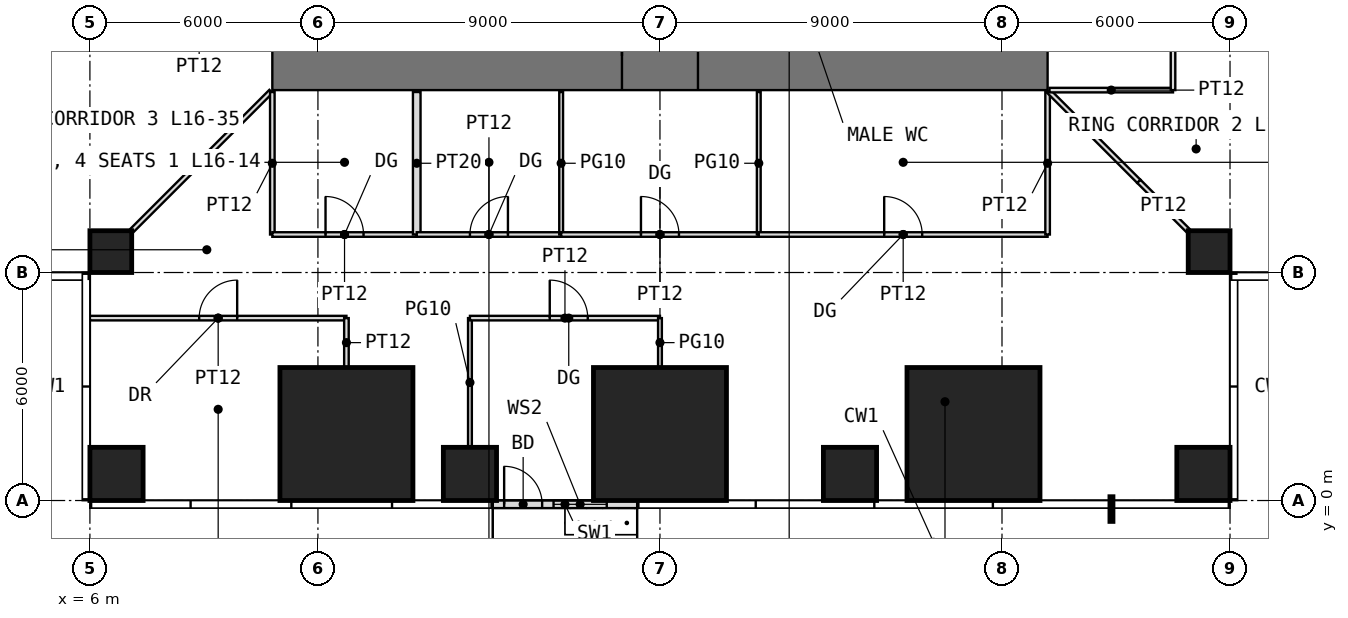
"""IFC4 building model, lengths in metres.
Left out: names, types, materials, properties, quantities, classifications, styles, units other than length and angle.
Written with IfcOpenShell. Run it as: python <this file> out.ifc"""

import sys

from ifc_helpers import new_model, si_unit, direction, frame, frame_2d, origin, origin_2d, place, context, subcontext, project, spatial, rectangle, extrude, element, fill, save


model = new_model("IFC4")
c1 = context("Model", 3, precision=1e-05, world=origin(), true_north=direction((0.0, 1.0)))
c2 = subcontext(c1, "Body", "Model", "MODEL_VIEW")
j1 = project(units=[si_unit("LENGTHUNIT", "METRE"), si_unit("PLANEANGLEUNIT", "RADIAN")], contexts=[c1])
p1 = place(None, origin())
s1 = spatial("IfcSite", under=j1, at=p1, CompositionType="ELEMENT")
p2 = place(p1, origin())
s2 = spatial("IfcBuilding", under=s1, at=p2, CompositionType="ELEMENT")
p3 = place(p2, frame((0.0, 0.0, 70.5)))
s3 = spatial("IfcBuildingStorey", under=s2, at=p3, CompositionType="ELEMENT", Elevation=70.5)
p4 = place(p3, frame((6.7, 0.7, 0.0), z_axis=(0.0, 0.0, 1.0), x_axis=(1.0, 0.0, 0.0)))
e1 = element("IfcColumn", 1, at=p4, inside=s3, PredefinedType="COLUMN", context=c2, shape_type="SweptSolid", body=[
    extrude(rectangle(XDim=1.4, YDim=1.4, at=origin_2d()), origin(), (0.0, 0.0, 1.0), 4.0),
])
p5 = place(p3, frame((12.75, 1.75, 0.0), z_axis=(0.0, 0.0, 1.0), x_axis=(1.0, 0.0, 0.0)))
e2 = element("IfcColumn", 2, at=p5, inside=s3, PredefinedType="COLUMN", context=c2, shape_type="SweptSolid", body=[
    extrude(rectangle(XDim=3.5, YDim=3.5, at=origin_2d()), origin(), (0.0, 0.0, 1.0), 4.0),
])
p6 = place(p3, frame((16.0, 0.7, 0.0), z_axis=(0.0, 0.0, 1.0), x_axis=(1.0, 0.0, 0.0)))
e3 = element("IfcColumn", 3, at=p6, inside=s3, PredefinedType="COLUMN", context=c2, shape_type="SweptSolid", body=[
    extrude(rectangle(XDim=1.4, YDim=1.4, at=origin_2d()), origin(), (0.0, 0.0, 1.0), 4.0),
])
p7 = place(p3, frame((21.0, 1.75, 0.0), z_axis=(0.0, 0.0, 1.0), x_axis=(1.0, 0.0, 0.0)))
e4 = element("IfcColumn", 4, at=p7, inside=s3, PredefinedType="COLUMN", context=c2, shape_type="SweptSolid", body=[
    extrude(rectangle(XDim=3.5, YDim=3.5, at=origin_2d()), origin(), (0.0, 0.0, 1.0), 4.0),
])
p8 = place(p3, frame((26.0, 0.7, 0.0), z_axis=(0.0, 0.0, 1.0), x_axis=(1.0, 0.0, 0.0)))
e5 = element("IfcColumn", 5, at=p8, inside=s3, PredefinedType="COLUMN", context=c2, shape_type="SweptSolid", body=[
    extrude(rectangle(XDim=1.4, YDim=1.4, at=origin_2d()), origin(), (0.0, 0.0, 1.0), 4.0),
])
p9 = place(p3, frame((29.25, 1.75, 0.0), z_axis=(0.0, 0.0, 1.0), x_axis=(1.0, 0.0, 0.0)))
e6 = element("IfcColumn", 6, at=p9, inside=s3, PredefinedType="COLUMN", context=c2, shape_type="SweptSolid", body=[
    extrude(rectangle(XDim=3.5, YDim=3.5, at=origin_2d()), origin(), (0.0, 0.0, 1.0), 4.0),
])
p10 = place(p3, frame((35.3, 0.7, 0.0), z_axis=(0.0, 0.0, 1.0), x_axis=(1.0, 0.0, 0.0)))
e7 = element("IfcColumn", 7, at=p10, inside=s3, PredefinedType="COLUMN", context=c2, shape_type="SweptSolid", body=[
    extrude(rectangle(XDim=1.4, YDim=1.4, at=origin_2d()), origin(), (0.0, 0.0, 1.0), 4.0),
])
for number, where, z_axis, x_axis in (
    (8, (6.55, 6.55, 0.0), (0.0, 0.0, 1.0), (1.0, 0.0, 0.0)),
    (9, (35.45, 6.55, 0.0), (0.0, 0.0, 1.0), (1.0, 0.0, 0.0)),
):
    element("IfcColumn", number, at=place(p3, frame(where, z_axis=z_axis, x_axis=x_axis)), inside=s3, PredefinedType="COLUMN", context=c2, shape_type="SweptSolid", body=[
        extrude(rectangle(XDim=1.1, YDim=1.1, at=origin_2d()), origin(), (0.0, 0.0, 1.0), 4.0),
    ])
p11 = place(p3, frame((16.6, -0.1, 0.0), z_axis=(0.0, 0.0, 1.0), x_axis=(1.0, 0.0, 0.0)))
e10 = element("IfcWall", 10, at=p11, inside=s3, PredefinedType="USERDEFINED", context=c2, shape_type="SweptSolid", body=[
    extrude(rectangle(XDim=3.8, YDim=0.2, at=frame_2d((1.9, 0.0))), origin(), (0.0, 0.0, 1.0), 3.75),
])
p12 = place(p11, frame((0.3, 0.0, 0.0)))
e11 = element("IfcOpeningElement", 11, at=p12, cuts=e10, PredefinedType="OPENING", context=c2, shape_type="SweptSolid", body=[
    extrude(rectangle(XDim=1.0, YDim=2.4, at=frame_2d((0.5, 1.2))), frame((0.0, 0.11, 0.0), z_axis=(0.0, -1.0, 0.0), x_axis=(1.0, 0.0, 0.0)), (0.0, 0.0, 1.0), 0.22),
])
p13 = place(p11, frame((1.6, 0.0, 0.3)))
e12 = element("IfcOpeningElement", 12, at=p13, cuts=e10, PredefinedType="OPENING", context=c2, shape_type="SweptSolid", body=[
    extrude(rectangle(XDim=1.4, YDim=2.7, at=frame_2d((0.7, 1.35))), frame((0.0, 0.11, 0.0), z_axis=(0.0, -1.0, 0.0), x_axis=(1.0, 0.0, 0.0)), (0.0, 0.0, 1.0), 0.22),
])
p14 = place(p3, frame((10.8, 11.7, -0.05), z_axis=(0.0, 0.0, 1.0), x_axis=(1.0, 0.0, 0.0)))
e13 = element("IfcWall", 13, at=p14, inside=s3, PredefinedType="SHEAR", context=c2, shape_type="SweptSolid", body=[
    extrude(rectangle(XDim=20.4, YDim=1.8, at=frame_2d((10.2, 0.0))), origin(), (0.0, 0.0, 1.0), 4.0),
])
p15 = place(p14, frame((9.2, 0.0, 0.05)))
e14 = element("IfcOpeningElement", 14, at=p15, cuts=e13, PredefinedType="OPENING", context=c2, shape_type="SweptSolid", body=[
    extrude(rectangle(XDim=2.0, YDim=2.2, at=frame_2d((1.0, 1.1))), frame((0.0, 0.91, 0.0), z_axis=(0.0, -1.0, 0.0), x_axis=(1.0, 0.0, 0.0)), (0.0, 0.0, 1.0), 1.82),
])
p16 = place(p3, frame((6.0, 4.8, 0.0), z_axis=(0.0, 0.0, 1.0), x_axis=(1.0, 0.0, 0.0)))
e15 = element("IfcWall", 15, at=p16, inside=s3, PredefinedType="PARTITIONING", context=c2, shape_type="SweptSolid", body=[
    extrude(rectangle(XDim=6.75, YDim=0.12, at=frame_2d((3.375, 0.0))), origin(), (0.0, 0.0, 1.0), 3.75),
])
p17 = place(p16, frame((2.875, 0.0, 0.0)))
e16 = element("IfcOpeningElement", 16, at=p17, cuts=e15, PredefinedType="OPENING", context=c2, shape_type="SweptSolid", body=[
    extrude(rectangle(XDim=1.0, YDim=2.2, at=frame_2d((0.5, 1.1))), frame((0.0, 0.07, 0.0), z_axis=(0.0, -1.0, 0.0), x_axis=(1.0, 0.0, 0.0)), (0.0, 0.0, 1.0), 0.14),
])
p18 = place(p3, frame((7.11, 7.11, 0.0), z_axis=(0.0, 0.0, 1.0), x_axis=(0.707106781187, 0.707106781187, 0.0)))
e17 = element("IfcWall", 17, at=p18, inside=s3, PredefinedType="PARTITIONING", context=c2, shape_type="SweptSolid", body=[
    extrude(rectangle(XDim=5.168, YDim=0.12, at=frame_2d((2.584, 0.0))), origin(), (0.0, 0.0, 1.0), 3.75),
])
p19 = place(p3, frame((10.8, 7.0, 0.0), z_axis=(0.0, 0.0, 1.0), x_axis=(0.0, 1.0, 0.0)))
e18 = element("IfcWall", 18, at=p19, inside=s3, PredefinedType="PARTITIONING", context=c2, shape_type="SweptSolid", body=[
    extrude(rectangle(XDim=3.75, YDim=0.12, at=frame_2d((1.875, 0.0))), origin(), (0.0, 0.0, 1.0), 3.75),
])
p20 = place(p3, frame((10.8, 7.0, 0.0), z_axis=(0.0, 0.0, 1.0), x_axis=(1.0, 0.0, 0.0)))
e19 = element("IfcWall", 19, at=p20, inside=s3, PredefinedType="PARTITIONING", context=c2, shape_type="SweptSolid", body=[
    extrude(rectangle(XDim=3.8, YDim=0.12, at=frame_2d((1.9, 0.0))), origin(), (0.0, 0.0, 1.0), 3.75),
])
p21 = place(p20, frame((1.4, 0.0, 0.0)))
e20 = element("IfcOpeningElement", 20, at=p21, cuts=e19, PredefinedType="OPENING", context=c2, shape_type="SweptSolid", body=[
    extrude(rectangle(XDim=1.0, YDim=2.4, at=frame_2d((0.5, 1.2))), frame((0.0, 0.07, 0.0), z_axis=(0.0, -1.0, 0.0), x_axis=(1.0, 0.0, 0.0)), (0.0, 0.0, 1.0), 0.14),
])
p22 = place(p3, frame((12.75, 3.51, 0.0), z_axis=(0.0, 0.0, 1.0), x_axis=(0.0, 1.0, 0.0)))
e21 = element("IfcWall", 21, at=p22, inside=s3, PredefinedType="PARTITIONING", context=c2, shape_type="SweptSolid", body=[
    extrude(rectangle(XDim=1.29, YDim=0.12, at=frame_2d((0.645, 0.0))), origin(), (0.0, 0.0, 1.0), 3.75),
])
p23 = place(p3, frame((14.6, 7.0, 0.0), z_axis=(0.0, 0.0, 1.0), x_axis=(0.0, 1.0, 0.0)))
e22 = element("IfcWall", 22, at=p23, inside=s3, PredefinedType="PARTITIONING", context=c2, shape_type="SweptSolid", body=[
    extrude(rectangle(XDim=3.75, YDim=0.2, at=frame_2d((1.875, 0.0))), origin(), (0.0, 0.0, 1.0), 3.75),
])
p24 = place(p3, frame((14.6, 7.0, 0.0), z_axis=(0.0, 0.0, 1.0), x_axis=(1.0, 0.0, 0.0)))
e23 = element("IfcWall", 23, at=p24, inside=s3, PredefinedType="PARTITIONING", context=c2, shape_type="SweptSolid", body=[
    extrude(rectangle(XDim=3.8, YDim=0.12, at=frame_2d((1.9, 0.0))), origin(), (0.0, 0.0, 1.0), 3.75),
])
p25 = place(p24, frame((1.4, 0.0, 0.0)))
e24 = element("IfcOpeningElement", 24, at=p25, cuts=e23, PredefinedType="OPENING", context=c2, shape_type="SweptSolid", body=[
    extrude(rectangle(XDim=1.0, YDim=2.4, at=frame_2d((0.5, 1.2))), frame((0.0, 0.07, 0.0), z_axis=(0.0, -1.0, 0.0), x_axis=(1.0, 0.0, 0.0)), (0.0, 0.0, 1.0), 0.14),
])
p26 = place(p3, frame((16.0, 1.41, 0.0), z_axis=(0.0, 0.0, 1.0), x_axis=(0.0, 1.0, 0.0)))
e25 = element("IfcWall", 25, at=p26, inside=s3, PredefinedType="PARTITIONING", context=c2, shape_type="SweptSolid", body=[
    extrude(rectangle(XDim=3.39, YDim=0.1, at=frame_2d((1.695, 0.0))), origin(), (0.0, 0.0, 1.0), 3.75),
])
p27 = place(p3, frame((16.0, 4.8, 0.0), z_axis=(0.0, 0.0, 1.0), x_axis=(1.0, 0.0, 0.0)))
e26 = element("IfcWall", 26, at=p27, inside=s3, PredefinedType="PARTITIONING", context=c2, shape_type="SweptSolid", body=[
    extrude(rectangle(XDim=5.0, YDim=0.12, at=frame_2d((2.5, 0.0))), origin(), (0.0, 0.0, 1.0), 3.75),
])
p28 = place(p27, frame((2.1, 0.0, 0.0)))
e27 = element("IfcOpeningElement", 27, at=p28, cuts=e26, PredefinedType="OPENING", context=c2, shape_type="SweptSolid", body=[
    extrude(rectangle(XDim=1.0, YDim=2.4, at=frame_2d((0.5, 1.2))), frame((0.0, 0.07, 0.0), z_axis=(0.0, -1.0, 0.0), x_axis=(1.0, 0.0, 0.0)), (0.0, 0.0, 1.0), 0.14),
])
p29 = place(p3, frame((18.4, 7.0, 0.0), z_axis=(0.0, 0.0, 1.0), x_axis=(0.0, 1.0, 0.0)))
e28 = element("IfcWall", 28, at=p29, inside=s3, PredefinedType="PARTITIONING", context=c2, shape_type="SweptSolid", body=[
    extrude(rectangle(XDim=3.75, YDim=0.1, at=frame_2d((1.875, 0.0))), origin(), (0.0, 0.0, 1.0), 3.75),
])
p30 = place(p3, frame((18.4, 7.0, 0.0), z_axis=(0.0, 0.0, 1.0), x_axis=(1.0, 0.0, 0.0)))
e29 = element("IfcWall", 29, at=p30, inside=s3, PredefinedType="PARTITIONING", context=c2, shape_type="SweptSolid", body=[
    extrude(rectangle(XDim=5.2, YDim=0.12, at=frame_2d((2.6, 0.0))), origin(), (0.0, 0.0, 1.0), 3.75),
])
p31 = place(p30, frame((2.1, 0.0, 0.0)))
e30 = element("IfcOpeningElement", 30, at=p31, cuts=e29, PredefinedType="OPENING", context=c2, shape_type="SweptSolid", body=[
    extrude(rectangle(XDim=1.0, YDim=2.4, at=frame_2d((0.5, 1.2))), frame((0.0, 0.07, 0.0), z_axis=(0.0, -1.0, 0.0), x_axis=(1.0, 0.0, 0.0)), (0.0, 0.0, 1.0), 0.14),
])
p32 = place(p3, frame((21.0, 3.51, 0.0), z_axis=(0.0, 0.0, 1.0), x_axis=(0.0, 1.0, 0.0)))
e31 = element("IfcWall", 31, at=p32, inside=s3, PredefinedType="PARTITIONING", context=c2, shape_type="SweptSolid", body=[
    extrude(rectangle(XDim=1.29, YDim=0.1, at=frame_2d((0.645, 0.0))), origin(), (0.0, 0.0, 1.0), 3.75),
])
p33 = place(p3, frame((23.6, 7.0, 0.0), z_axis=(0.0, 0.0, 1.0), x_axis=(0.0, 1.0, 0.0)))
e32 = element("IfcWall", 32, at=p33, inside=s3, PredefinedType="PARTITIONING", context=c2, shape_type="SweptSolid", body=[
    extrude(rectangle(XDim=3.75, YDim=0.1, at=frame_2d((1.875, 0.0))), origin(), (0.0, 0.0, 1.0), 3.75),
])
p34 = place(p3, frame((23.6, 7.0, 0.0), z_axis=(0.0, 0.0, 1.0), x_axis=(1.0, 0.0, 0.0)))
e33 = element("IfcWall", 33, at=p34, inside=s3, PredefinedType="PARTITIONING", context=c2, shape_type="SweptSolid", body=[
    extrude(rectangle(XDim=7.6, YDim=0.12, at=frame_2d((3.8, 0.0))), origin(), (0.0, 0.0, 1.0), 3.75),
])
p35 = place(p34, frame((3.3, 0.0, 0.0)))
e34 = element("IfcOpeningElement", 34, at=p35, cuts=e33, PredefinedType="OPENING", context=c2, shape_type="SweptSolid", body=[
    extrude(rectangle(XDim=1.0, YDim=2.4, at=frame_2d((0.5, 1.2))), frame((0.0, 0.07, 0.0), z_axis=(0.0, -1.0, 0.0), x_axis=(1.0, 0.0, 0.0)), (0.0, 0.0, 1.0), 0.14),
])
p36 = place(p3, frame((31.2, 7.0, 0.0), z_axis=(0.0, 0.0, 1.0), x_axis=(0.0, 1.0, 0.0)))
e35 = element("IfcWall", 35, at=p36, inside=s3, PredefinedType="PARTITIONING", context=c2, shape_type="SweptSolid", body=[
    extrude(rectangle(XDim=3.75, YDim=0.12, at=frame_2d((1.875, 0.0))), origin(), (0.0, 0.0, 1.0), 3.75),
])
p37 = place(p3, frame((31.235, 10.765, 0.0), z_axis=(0.0, 0.0, 1.0), x_axis=(0.707106781187, -0.707106781187, 0.0)))
e36 = element("IfcWall", 36, at=p37, inside=s3, PredefinedType="PARTITIONING", context=c2, shape_type="SweptSolid", body=[
    extrude(rectangle(XDim=3.346, YDim=0.12, at=frame_2d((1.673, 0.0))), origin(), (0.0, 0.0, 1.0), 3.75),
])
p38 = place(p3, frame((31.25, 10.8, 0.0), z_axis=(0.0, 0.0, 1.0), x_axis=(1.0, 0.0, 0.0)))
e37 = element("IfcWall", 37, at=p38, inside=s3, PredefinedType="PARTITIONING", context=c2, shape_type="SweptSolid", body=[
    extrude(rectangle(XDim=3.25, YDim=0.12, at=frame_2d((1.625, 0.0))), origin(), (0.0, 0.0, 1.0), 3.75),
])
p39 = place(p3, frame((33.602, 8.398, 0.0), z_axis=(0.0, 0.0, 1.0), x_axis=(0.707106781187, -0.707106781187, 0.0)))
e38 = element("IfcWall", 38, at=p39, inside=s3, PredefinedType="PARTITIONING", context=c2, shape_type="SweptSolid", body=[
    extrude(rectangle(XDim=1.822, YDim=0.12, at=frame_2d((0.911, 0.0))), origin(), (0.0, 0.0, 1.0), 3.75),
])
p40 = place(p3, frame((34.5, 10.8, 0.0), z_axis=(0.0, 0.0, 1.0), x_axis=(0.0, 1.0, 0.0)))
e39 = element("IfcWall", 39, at=p40, inside=s3, PredefinedType="PARTITIONING", context=c2, shape_type="SweptSolid", body=[
    extrude(rectangle(XDim=3.8, YDim=0.12, at=frame_2d((1.9, 0.0))), origin(), (0.0, 0.0, 1.0), 3.75),
])
p41 = place(p40, frame((1.4, 0.0, 0.0)))
e40 = element("IfcOpeningElement", 40, at=p41, cuts=e39, PredefinedType="OPENING", context=c2, shape_type="SweptSolid", body=[
    extrude(rectangle(XDim=1.0, YDim=2.2, at=frame_2d((0.5, 1.1))), frame((0.0, 0.07, 0.0), z_axis=(0.0, -1.0, 0.0), x_axis=(1.0, 0.0, 0.0)), (0.0, 0.0, 1.0), 0.14),
])
p42 = place(p12, origin())
e41 = element("IfcDoor", 41, at=p42, inside=s3, OperationType="SINGLE_SWING_LEFT", PredefinedType="DOOR", context=c2, shape_type="SweptSolid", body=[
    extrude(rectangle(XDim=1.0, YDim=2.4, at=frame_2d((0.5, 1.2))), frame((0.0, 0.025, 0.0), z_axis=(0.0, -1.0, 0.0), x_axis=(1.0, 0.0, 0.0)), (0.0, 0.0, 1.0), 0.05),
])
fill(e11, e41)
p43 = place(p13, origin())
e42 = element("IfcWindow", 42, at=p43, inside=s3, PartitioningType="SINGLE_PANEL", PredefinedType="WINDOW", context=c2, shape_type="SweptSolid", body=[
    extrude(rectangle(XDim=1.4, YDim=2.7, at=frame_2d((0.7, 1.35))), frame((0.0, 0.03, 0.0), z_axis=(0.0, -1.0, 0.0), x_axis=(1.0, 0.0, 0.0)), (0.0, 0.0, 1.0), 0.06),
])
fill(e12, e42)
p44 = place(p15, origin())
e43 = element("IfcDoor", 43, at=p44, inside=s3, OperationType="DOUBLE_DOOR_SINGLE_SWING", PredefinedType="DOOR", context=c2, shape_type="SweptSolid", body=[
    extrude(rectangle(XDim=2.0, YDim=2.2, at=frame_2d((1.0, 1.1))), frame((0.0, 0.025, 0.0), z_axis=(0.0, -1.0, 0.0), x_axis=(1.0, 0.0, 0.0)), (0.0, 0.0, 1.0), 0.05),
])
fill(e14, e43)
p45 = place(p21, origin())
e44 = element("IfcDoor", 44, at=p45, inside=s3, OperationType="SINGLE_SWING_LEFT", PredefinedType="DOOR", context=c2, shape_type="SweptSolid", body=[
    extrude(rectangle(XDim=1.0, YDim=2.4, at=frame_2d((0.5, 1.2))), frame((0.0, 0.025, 0.0), z_axis=(0.0, -1.0, 0.0), x_axis=(1.0, 0.0, 0.0)), (0.0, 0.0, 1.0), 0.05),
])
fill(e20, e44)
p46 = place(p25, origin())
e45 = element("IfcDoor", 45, at=p46, inside=s3, OperationType="SINGLE_SWING_RIGHT", PredefinedType="DOOR", context=c2, shape_type="SweptSolid", body=[
    extrude(rectangle(XDim=1.0, YDim=2.4, at=frame_2d((0.5, 1.2))), frame((0.0, 0.025, 0.0), z_axis=(0.0, -1.0, 0.0), x_axis=(1.0, 0.0, 0.0)), (0.0, 0.0, 1.0), 0.05),
])
fill(e24, e45)
p47 = place(p35, origin())
e46 = element("IfcDoor", 46, at=p47, inside=s3, OperationType="SINGLE_SWING_LEFT", PredefinedType="DOOR", context=c2, shape_type="SweptSolid", body=[
    extrude(rectangle(XDim=1.0, YDim=2.4, at=frame_2d((0.5, 1.2))), frame((0.0, 0.025, 0.0), z_axis=(0.0, -1.0, 0.0), x_axis=(1.0, 0.0, 0.0)), (0.0, 0.0, 1.0), 0.05),
])
fill(e34, e46)
p48 = place(p17, origin())
e47 = element("IfcDoor", 47, at=p48, inside=s3, OperationType="SINGLE_SWING_RIGHT", PredefinedType="DOOR", context=c2, shape_type="SweptSolid", body=[
    extrude(rectangle(XDim=1.0, YDim=2.2, at=frame_2d((0.5, 1.1))), frame((0.0, 0.025, 0.0), z_axis=(0.0, -1.0, 0.0), x_axis=(1.0, 0.0, 0.0)), (0.0, 0.0, 1.0), 0.05),
])
fill(e16, e47)
p49 = place(p28, origin())
e48 = element("IfcDoor", 48, at=p49, inside=s3, OperationType="SINGLE_SWING_LEFT", PredefinedType="DOOR", context=c2, shape_type="SweptSolid", body=[
    extrude(rectangle(XDim=1.0, YDim=2.4, at=frame_2d((0.5, 1.2))), frame((0.0, 0.025, 0.0), z_axis=(0.0, -1.0, 0.0), x_axis=(1.0, 0.0, 0.0)), (0.0, 0.0, 1.0), 0.05),
])
fill(e27, e48)
p50 = place(p31, origin())
e49 = element("IfcDoor", 49, at=p50, inside=s3, OperationType="SINGLE_SWING_LEFT", PredefinedType="DOOR", context=c2, shape_type="SweptSolid", body=[
    extrude(rectangle(XDim=1.0, YDim=2.4, at=frame_2d((0.5, 1.2))), frame((0.0, 0.025, 0.0), z_axis=(0.0, -1.0, 0.0), x_axis=(1.0, 0.0, 0.0)), (0.0, 0.0, 1.0), 0.05),
])
fill(e30, e49)
save(model, sys.argv[1])
